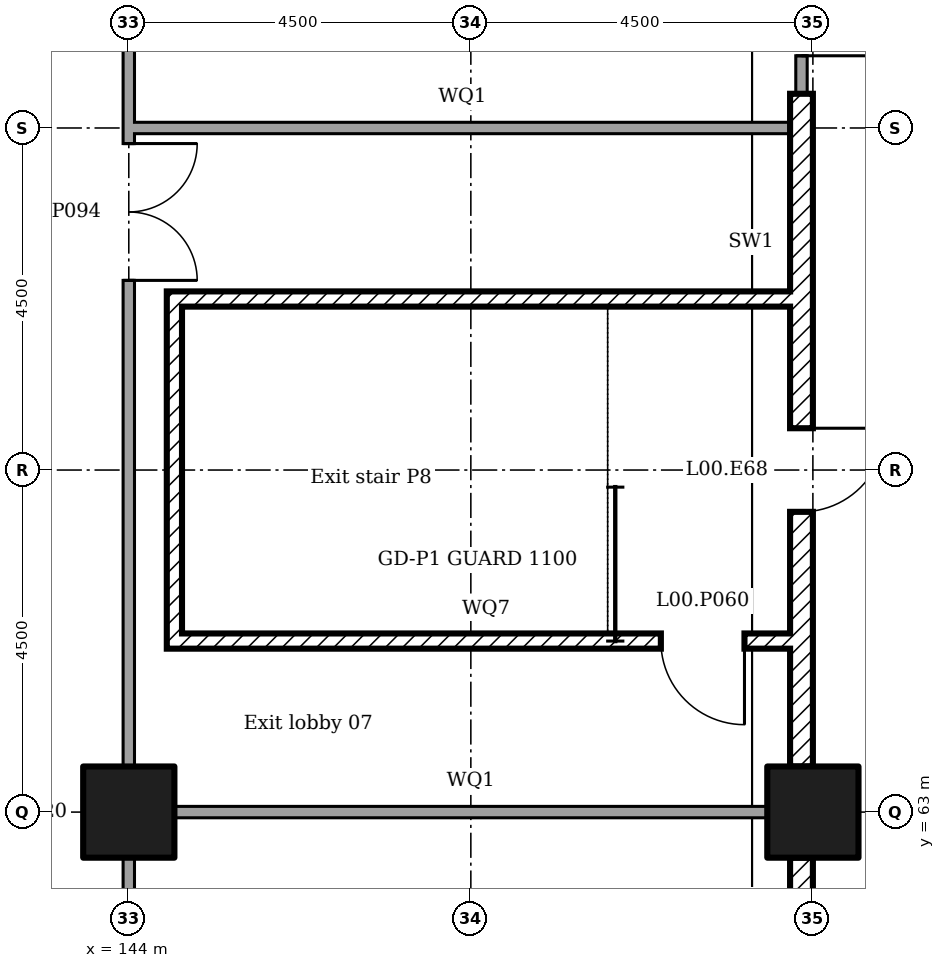
"""IFC4 building model, lengths in metres.
Left out: names, types, materials, properties, quantities, classifications, styles, units other than length and angle.
Written with IfcOpenShell. Run it as: python <this file> out.ifc"""

import sys

from ifc_helpers import new_model, si_unit, direction, frame, frame_2d, origin, origin_2d, place, context, subcontext, project, spatial, rectangle, extrude, element, fill, save


model = new_model("IFC4")
c1 = context("Model", 3, precision=1e-05, world=origin(), true_north=direction((0.0, 1.0)))
c2 = subcontext(c1, "Body", "Model", "MODEL_VIEW")
j1 = project(units=[si_unit("LENGTHUNIT", "METRE"), si_unit("PLANEANGLEUNIT", "RADIAN")], contexts=[c1])
p1 = place(None, origin())
s1 = spatial("IfcSite", under=j1, at=p1, CompositionType="ELEMENT")
p2 = place(p1, origin())
s2 = spatial("IfcBuilding", under=s1, at=p2, CompositionType="ELEMENT")
p3 = place(p2, origin())
s3 = spatial("IfcBuildingStorey", under=s2, at=p3, CompositionType="ELEMENT", Elevation=0.0)
for number, where in (
    (1, (144.0, 63.0, 0.0)),
    (2, (153.0, 63.0, 0.0)),
):
    element("IfcColumn", number, at=place(p3, frame(where)), inside=s3, PredefinedType="COLUMN", context=c2, shape_type="SweptSolid", body=[
        extrude(rectangle(XDim=1.2, YDim=1.2, at=origin_2d()), origin(), (0.0, 0.0, 1.0), 6.0),
    ])
p4 = place(p3, frame((152.85, 61.3, 0.0), z_axis=(0.0, 0.0, 1.0), x_axis=(0.0, 1.0, 0.0)))
e3 = element("IfcWall", 3, at=p4, inside=s3, PredefinedType="ELEMENTEDWALL", context=c2, shape_type="SweptSolid", body=[
    extrude(rectangle(XDim=1.1, YDim=0.3, at=frame_2d((0.55, 0.0))), origin(), (0.0, 0.0, 1.0), 5.55),
])
p5 = place(p3, frame((152.85, 63.6, 0.0), z_axis=(0.0, 0.0, 1.0), x_axis=(0.0, 1.0, 0.0)))
e4 = element("IfcWall", 4, at=p5, inside=s3, PredefinedType="ELEMENTEDWALL", context=c2, shape_type="SweptSolid", body=[
    extrude(rectangle(XDim=2.85, YDim=0.3, at=frame_2d((1.425, 0.0))), origin(), (0.0, 0.0, 1.0), 5.55),
])
p6 = place(p3, frame((152.85, 66.45, 0.0), z_axis=(0.0, 0.0, 1.0), x_axis=(0.0, 1.0, 0.0)))
e5 = element("IfcWall", 5, at=p6, inside=s3, PredefinedType="ELEMENTEDWALL", context=c2, shape_type="SweptSolid", body=[
    extrude(rectangle(XDim=2.1, YDim=0.3, at=frame_2d((1.05, 0.0))), origin(), (0.0, 0.0, 1.0), 5.55),
])
p7 = place(p6, frame((0.5, 0.0, 0.0)))
e6 = element("IfcOpeningElement", 6, at=p7, cuts=e5, PredefinedType="OPENING", context=c2, shape_type="SweptSolid", body=[
    extrude(rectangle(XDim=1.1, YDim=2.4, at=frame_2d((0.55, 1.2))), frame((0.0, 0.16, 0.0), z_axis=(0.0, -1.0, 0.0), x_axis=(1.0, 0.0, 0.0)), (0.0, 0.0, 1.0), 0.32),
])
p8 = place(p3, frame((152.85, 68.55, 0.0), z_axis=(0.0, 0.0, 1.0), x_axis=(0.0, 1.0, 0.0)))
e7 = element("IfcWall", 7, at=p8, inside=s3, PredefinedType="ELEMENTEDWALL", context=c2, shape_type="SweptSolid", body=[
    extrude(rectangle(XDim=3.9, YDim=0.3, at=frame_2d((1.95, 0.0))), origin(), (0.0, 0.0, 1.0), 5.55),
])
p9 = place(p3, frame((152.85, 72.45, 0.0), z_axis=(0.0, 0.0, 1.0), x_axis=(0.0, 1.0, 0.0)))
e8 = element("IfcWall", 8, at=p9, inside=s3, PredefinedType="SOLIDWALL", context=c2, shape_type="SweptSolid", body=[
    extrude(rectangle(XDim=3.45, YDim=0.15, at=frame_2d((1.725, 0.0))), origin(), (0.0, 0.0, 1.0), 5.55),
])
p10 = place(p9, frame((0.5, 0.0, 0.0)))
e9 = element("IfcOpeningElement", 9, at=p10, cuts=e8, PredefinedType="OPENING", context=c2, shape_type="SweptSolid", body=[
    extrude(rectangle(XDim=2.4, YDim=2.7, at=frame_2d((1.2, 1.35))), frame((0.0, 0.085, 0.0), z_axis=(0.0, -1.0, 0.0), x_axis=(1.0, 0.0, 0.0)), (0.0, 0.0, 1.0), 0.17),
])
p11 = place(p3, frame((144.0, 50.095, 0.0), z_axis=(0.0, 0.0, 1.0), x_axis=(0.0, 1.0, 0.0)))
e10 = element("IfcWall", 10, at=p11, inside=s3, PredefinedType="PARTITIONING", context=c2, shape_type="SweptSolid", body=[
    extrude(rectangle(XDim=12.31, YDim=0.15, at=frame_2d((6.155, 0.0))), origin(), (0.0, 0.0, 1.0), 5.55),
])
p12 = place(p11, frame((5.65, 0.0, 0.0)))
e11 = element("IfcOpeningElement", 11, at=p12, cuts=e10, PredefinedType="OPENING", context=c2, shape_type="SweptSolid", body=[
    extrude(rectangle(XDim=1.0, YDim=2.1, at=frame_2d((0.5, 1.05))), frame((0.0, 0.085, 0.0), z_axis=(0.0, -1.0, 0.0), x_axis=(1.0, 0.0, 0.0)), (0.0, 0.0, 1.0), 0.17),
])
p13 = place(p3, frame((144.0, 63.595, 0.0), z_axis=(0.0, 0.0, 1.0), x_axis=(0.0, 1.0, 0.0)))
e12 = element("IfcWall", 12, at=p13, inside=s3, PredefinedType="PARTITIONING", context=c2, shape_type="SweptSolid", body=[
    extrude(rectangle(XDim=8.48, YDim=0.15, at=frame_2d((4.24, 0.0))), origin(), (0.0, 0.0, 1.0), 5.55),
])
p14 = place(p13, frame((6.4, 0.0, 0.0)))
e13 = element("IfcOpeningElement", 13, at=p14, cuts=e12, PredefinedType="OPENING", context=c2, shape_type="SweptSolid", body=[
    extrude(rectangle(XDim=1.8, YDim=2.1, at=frame_2d((0.9, 1.05))), frame((0.0, 0.085, 0.0), z_axis=(0.0, -1.0, 0.0), x_axis=(1.0, 0.0, 0.0)), (0.0, 0.0, 1.0), 0.17),
])
p15 = place(p3, frame((144.0, 72.0, 0.0), z_axis=(0.0, 0.0, 1.0), x_axis=(0.0, 1.0, 0.0)))
e14 = element("IfcWall", 14, at=p15, inside=s3, PredefinedType="PARTITIONING", context=c2, shape_type="SweptSolid", body=[
    extrude(rectangle(XDim=3.905, YDim=0.15, at=frame_2d((1.953, 0.0))), origin(), (0.0, 0.0, 1.0), 5.55),
])
p16 = place(p3, frame((144.595, 63.0, 0.0)))
e15 = element("IfcWall", 15, at=p16, inside=s3, PredefinedType="PARTITIONING", context=c2, shape_type="SweptSolid", body=[
    extrude(rectangle(XDim=7.81, YDim=0.15, at=frame_2d((3.905, 0.0))), origin(), (0.0, 0.0, 1.0), 5.55),
])
p17 = place(p3, frame((144.075, 72.0, 0.0)))
e16 = element("IfcWall", 16, at=p17, inside=s3, PredefinedType="PARTITIONING", context=c2, shape_type="SweptSolid", body=[
    extrude(rectangle(XDim=8.625, YDim=0.15, at=frame_2d((4.312, 0.0))), origin(), (0.0, 0.0, 1.0), 5.55),
])
p18 = place(p3, frame((144.6, 65.15, 0.0), z_axis=(0.0, 0.0, 1.0), x_axis=(0.0, 1.0, 0.0)))
e17 = element("IfcWall", 17, at=p18, inside=s3, PredefinedType="SOLIDWALL", context=c2, shape_type="SweptSolid", body=[
    extrude(rectangle(XDim=4.7, YDim=0.2, at=frame_2d((2.35, 0.0))), origin(), (0.0, 0.0, 1.0), 5.55),
])
p19 = place(p3, frame((144.7, 65.25, 0.0)))
e18 = element("IfcWall", 18, at=p19, inside=s3, PredefinedType="SOLIDWALL", context=c2, shape_type="SweptSolid", body=[
    extrude(rectangle(XDim=8.0, YDim=0.2, at=frame_2d((4.0, 0.0))), origin(), (0.0, 0.0, 1.0), 5.55),
])
p20 = place(p19, frame((6.3, 0.0, 0.0)))
e19 = element("IfcOpeningElement", 19, at=p20, cuts=e18, PredefinedType="OPENING", context=c2, shape_type="SweptSolid", body=[
    extrude(rectangle(XDim=1.1, YDim=2.1, at=frame_2d((0.55, 1.05))), frame((0.0, 0.11, 0.0), z_axis=(0.0, -1.0, 0.0), x_axis=(1.0, 0.0, 0.0)), (0.0, 0.0, 1.0), 0.22),
])
p21 = place(p3, frame((144.7, 69.75, 0.0)))
e20 = element("IfcWall", 20, at=p21, inside=s3, PredefinedType="SOLIDWALL", context=c2, shape_type="SweptSolid", body=[
    extrude(rectangle(XDim=8.0, YDim=0.2, at=frame_2d((4.0, 0.0))), origin(), (0.0, 0.0, 1.0), 5.55),
])
p22 = place(p7, frame((1.1, 0.0, 0.0), x_axis=(-1.0, 0.0, 0.0)))
e21 = element("IfcDoor", 21, at=p22, inside=s3, OperationType="SINGLE_SWING_RIGHT", PredefinedType="NOTDEFINED", context=c2, shape_type="SweptSolid", body=[
    extrude(rectangle(XDim=1.1, YDim=2.4, at=frame_2d((0.55, 1.2))), frame((0.0, 0.025, 0.0), z_axis=(0.0, -1.0, 0.0), x_axis=(1.0, 0.0, 0.0)), (0.0, 0.0, 1.0), 0.05),
])
fill(e6, e21)
p23 = place(p10, frame((2.4, 0.0, 0.0), x_axis=(-1.0, 0.0, 0.0)))
e22 = element("IfcDoor", 22, at=p23, inside=s3, OperationType="DOUBLE_DOOR_DOUBLE_SWING", PredefinedType="NOTDEFINED", context=c2, shape_type="SweptSolid", body=[
    extrude(rectangle(XDim=2.4, YDim=2.7, at=frame_2d((1.2, 1.35))), frame((0.0, 0.025, 0.0), z_axis=(0.0, -1.0, 0.0), x_axis=(1.0, 0.0, 0.0)), (0.0, 0.0, 1.0), 0.05),
])
fill(e9, e22)
p24 = place(p20, frame((1.1, 0.0, 0.0), x_axis=(-1.0, 0.0, 0.0)))
e23 = element("IfcDoor", 23, at=p24, inside=s3, OperationType="SINGLE_SWING_RIGHT", PredefinedType="DOOR", context=c2, shape_type="SweptSolid", body=[
    extrude(rectangle(XDim=1.1, YDim=2.1, at=frame_2d((0.55, 1.05))), frame((0.0, 0.025, 0.0), z_axis=(0.0, -1.0, 0.0), x_axis=(1.0, 0.0, 0.0)), (0.0, 0.0, 1.0), 0.05),
])
fill(e19, e23)
p25 = place(p14, frame((1.8, 0.0, 0.0), x_axis=(-1.0, 0.0, 0.0)))
e24 = element("IfcDoor", 24, at=p25, inside=s3, OperationType="DOUBLE_DOOR_SINGLE_SWING", PredefinedType="DOOR", context=c2, shape_type="SweptSolid", body=[
    extrude(rectangle(XDim=1.8, YDim=2.1, at=frame_2d((0.9, 1.05))), frame((0.0, 0.025, 0.0), z_axis=(0.0, -1.0, 0.0), x_axis=(1.0, 0.0, 0.0)), (0.0, 0.0, 1.0), 0.05),
])
fill(e13, e24)
save(model, sys.argv[1])
